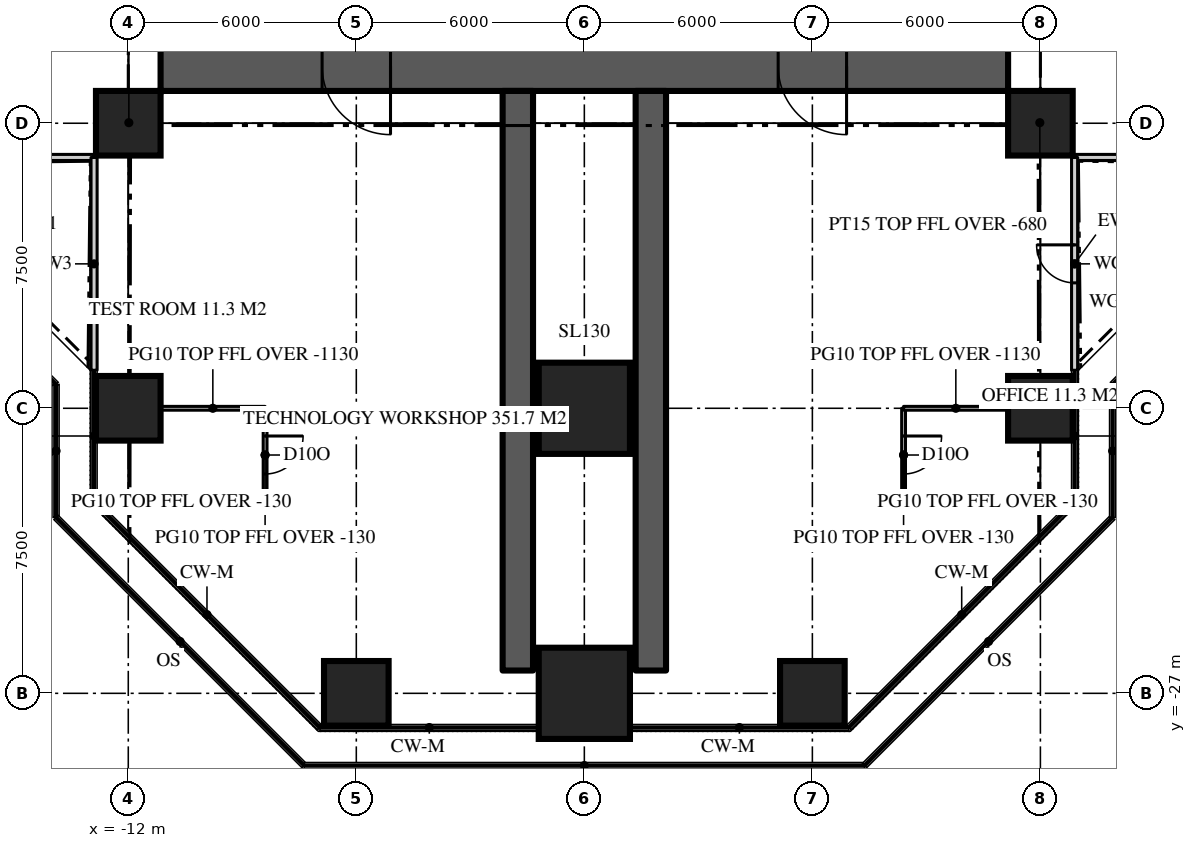
"""IFC4 building model, lengths in metres.
Left out: names, types, materials, properties, quantities, classifications, styles, units other than length and angle.
Written with IfcOpenShell. Run it as: python <this file> out.ifc"""

import sys

from ifc_helpers import new_model, si_unit, direction, frame, frame_2d, origin, origin_2d, place, context, subcontext, project, spatial, rectangle, extrude, element, fill, save


model = new_model("IFC4")
c1 = context("Model", 3, precision=1e-05, world=origin(), true_north=direction((0.0, 1.0)))
c2 = subcontext(c1, "Body", "Model", "MODEL_VIEW")
j1 = project(units=[si_unit("LENGTHUNIT", "METRE"), si_unit("PLANEANGLEUNIT", "RADIAN")], contexts=[c1])
p1 = place(None, origin())
s1 = spatial("IfcSite", under=j1, at=p1, CompositionType="ELEMENT")
p2 = place(p1, origin())
s2 = spatial("IfcBuilding", under=s1, at=p2, CompositionType="ELEMENT")
p3 = place(p2, frame((0.0, 0.0, 155.4)))
s3 = spatial("IfcBuildingStorey", under=s2, at=p3, CompositionType="ELEMENT", Elevation=155.4)
p4 = place(p3, frame((11.15, -10.5, 0.0), z_axis=(0.0, 0.0, 1.0), x_axis=(-1.0, 0.0, 0.0)))
e1 = element("IfcWall", 1, at=p4, inside=s3, PredefinedType="SHEAR", context=c2, shape_type="SweptSolid", body=[
    extrude(rectangle(XDim=22.3, YDim=1.3, at=frame_2d((11.15, 0.0))), origin(), (0.0, 0.0, 1.0), 3.9),
])
p5 = place(p4, frame((16.25, 0.0, 0.0)))
e2 = element("IfcOpeningElement", 2, at=p5, cuts=e1, PredefinedType="OPENING", context=c2, shape_type="SweptSolid", body=[
    extrude(rectangle(XDim=1.8, YDim=2.2, at=frame_2d((0.9, 1.1))), frame((0.0, 0.66, 0.0), z_axis=(0.0, -1.0, 0.0), x_axis=(1.0, 0.0, 0.0)), (0.0, 0.0, 1.0), 1.32),
])
p6 = place(p4, frame((4.25, 0.0, 0.0)))
e3 = element("IfcOpeningElement", 3, at=p6, cuts=e1, PredefinedType="OPENING", context=c2, shape_type="SweptSolid", body=[
    extrude(rectangle(XDim=1.8, YDim=2.2, at=frame_2d((0.9, 1.1))), frame((0.0, 0.66, 0.0), z_axis=(0.0, -1.0, 0.0), x_axis=(1.0, 0.0, 0.0)), (0.0, 0.0, 1.0), 1.32),
])
for number, where, z_axis, x_axis in (
    (4, (-1.75, -11.15, 0.0), (0.0, 0.0, 1.0), (0.0, -1.0, 0.0)),
    (5, (1.75, -11.15, 0.0), (0.0, 0.0, 1.0), (0.0, -1.0, 0.0)),
):
    element("IfcWall", number, at=place(p3, frame(where, z_axis=z_axis, x_axis=x_axis)), inside=s3, PredefinedType="SHEAR", context=c2, shape_type="SweptSolid", body=[
        extrude(rectangle(XDim=15.25, YDim=0.8, at=frame_2d((7.625, 0.0))), origin(), (0.0, 0.0, 1.0), 3.9),
    ])
p7 = place(p3, frame((-6.0, -27.0, 0.0), z_axis=(0.0, 0.0, 1.0), x_axis=(1.0, 0.0, 0.0)))
e6 = element("IfcColumn", 6, at=p7, inside=s3, PredefinedType="COLUMN", context=c2, shape_type="SweptSolid", body=[
    extrude(rectangle(XDim=1.7, YDim=1.7, at=origin_2d()), origin(), (0.0, 0.0, 1.0), 3.9),
])
p8 = place(p3, frame((0.0, -27.0, 0.0), z_axis=(0.0, 0.0, 1.0), x_axis=(1.0, 0.0, 0.0)))
e7 = element("IfcColumn", 7, at=p8, inside=s3, PredefinedType="COLUMN", context=c2, shape_type="SweptSolid", body=[
    extrude(rectangle(XDim=2.4, YDim=2.4, at=origin_2d()), origin(), (0.0, 0.0, 1.0), 3.9),
])
for number, where, z_axis, x_axis in (
    (8, (6.0, -27.0, 0.0), (0.0, 0.0, 1.0), (1.0, 0.0, 0.0)),
    (9, (-12.0, -19.5, 0.0), (0.0, 0.0, 1.0), (1.0, 0.0, 0.0)),
):
    element("IfcColumn", number, at=place(p3, frame(where, z_axis=z_axis, x_axis=x_axis)), inside=s3, PredefinedType="COLUMN", context=c2, shape_type="SweptSolid", body=[
        extrude(rectangle(XDim=1.7, YDim=1.7, at=origin_2d()), origin(), (0.0, 0.0, 1.0), 3.9),
    ])
p9 = place(p3, frame((0.0, -19.5, 0.0), z_axis=(0.0, 0.0, 1.0), x_axis=(1.0, 0.0, 0.0)))
e10 = element("IfcColumn", 10, at=p9, inside=s3, PredefinedType="COLUMN", context=c2, shape_type="SweptSolid", body=[
    extrude(rectangle(XDim=2.4, YDim=2.4, at=origin_2d()), origin(), (0.0, 0.0, 1.0), 3.9),
])
for number, where, z_axis, x_axis in (
    (11, (12.0, -19.5, 0.0), (0.0, 0.0, 1.0), (1.0, 0.0, 0.0)),
    (12, (-12.0, -12.0, 0.0), (0.0, 0.0, 1.0), (1.0, 0.0, 0.0)),
    (13, (12.0, -12.0, 0.0), (0.0, 0.0, 1.0), (1.0, 0.0, 0.0)),
):
    element("IfcColumn", number, at=place(p3, frame(where, z_axis=z_axis, x_axis=x_axis)), inside=s3, PredefinedType="COLUMN", context=c2, shape_type="SweptSolid", body=[
        extrude(rectangle(XDim=1.7, YDim=1.7, at=origin_2d()), origin(), (0.0, 0.0, 1.0), 3.9),
    ])
p10 = place(p3, frame((12.9, -12.9, 0.0), z_axis=(0.0, 0.0, 1.0), x_axis=(1.0, 0.0, 0.0)))
e14 = element("IfcWall", 14, at=p10, inside=s3, PredefinedType="SOLIDWALL", context=c2, shape_type="SweptSolid", body=[
    extrude(rectangle(XDim=5.6, YDim=0.16, at=frame_2d((2.8, 0.0))), origin(), (0.0, 0.0, 1.0), 3.77),
])
p11 = place(p3, frame((-18.5, -12.9, 0.0), z_axis=(0.0, 0.0, 1.0), x_axis=(1.0, 0.0, 0.0)))
e15 = element("IfcWall", 15, at=p11, inside=s3, PredefinedType="SOLIDWALL", context=c2, shape_type="SweptSolid", body=[
    extrude(rectangle(XDim=5.6, YDim=0.16, at=frame_2d((2.8, 0.0))), origin(), (0.0, 0.0, 1.0), 3.77),
])
p12 = place(p11, frame((2.3, 0.0, 0.0)))
e16 = element("IfcOpeningElement", 16, at=p12, cuts=e15, PredefinedType="OPENING", context=c2, shape_type="SweptSolid", body=[
    extrude(rectangle(XDim=1.0, YDim=2.2, at=frame_2d((0.5, 1.1))), frame((0.0, 0.09, 0.0), z_axis=(0.0, -1.0, 0.0), x_axis=(1.0, 0.0, 0.0)), (0.0, 0.0, 1.0), 0.18),
])
p13 = place(p3, frame((-12.9, -12.9, 0.0), z_axis=(0.0, 0.0, 1.0), x_axis=(0.0, -1.0, 0.0)))
e17 = element("IfcWall", 17, at=p13, inside=s3, PredefinedType="SOLIDWALL", context=c2, shape_type="SweptSolid", body=[
    extrude(rectangle(XDim=5.6, YDim=0.16, at=frame_2d((2.8, 0.0))), origin(), (0.0, 0.0, 1.0), 3.77),
])
p14 = place(p3, frame((12.9, -18.5, 0.0), z_axis=(0.0, 0.0, 1.0), x_axis=(0.0, 1.0, 0.0)))
e18 = element("IfcWall", 18, at=p14, inside=s3, PredefinedType="SOLIDWALL", context=c2, shape_type="SweptSolid", body=[
    extrude(rectangle(XDim=5.6, YDim=0.16, at=frame_2d((2.8, 0.0))), origin(), (0.0, 0.0, 1.0), 3.77),
])
p15 = place(p14, frame((2.3, 0.0, 0.0)))
e19 = element("IfcOpeningElement", 19, at=p15, cuts=e18, PredefinedType="OPENING", context=c2, shape_type="SweptSolid", body=[
    extrude(rectangle(XDim=1.0, YDim=2.2, at=frame_2d((0.5, 1.1))), frame((0.0, 0.09, 0.0), z_axis=(0.0, -1.0, 0.0), x_axis=(1.0, 0.0, 0.0)), (0.0, 0.0, 1.0), 0.18),
])
p16 = place(p3, frame((8.4, -19.5, 0.0), z_axis=(0.0, 0.0, 1.0), x_axis=(0.0, -1.0, 0.0)))
e20 = element("IfcWall", 20, at=p16, inside=s3, PredefinedType="PARTITIONING", context=c2, shape_type="SweptSolid", body=[
    extrude(rectangle(XDim=2.459, YDim=0.1, at=frame_2d((1.229, 0.0))), origin(), (0.0, 0.0, 1.0), 3.77),
])
p17 = place(p16, frame((0.729, 0.0, 0.0)))
e21 = element("IfcOpeningElement", 21, at=p17, cuts=e20, PredefinedType="OPENING", context=c2, shape_type="SweptSolid", body=[
    extrude(rectangle(XDim=1.0, YDim=2.2, at=frame_2d((0.5, 1.1))), frame((0.0, 0.06, 0.0), z_axis=(0.0, -1.0, 0.0), x_axis=(1.0, 0.0, 0.0)), (0.0, 0.0, 1.0), 0.12),
])
p18 = place(p3, frame((8.4, -19.5, 0.0), z_axis=(0.0, 0.0, 1.0), x_axis=(1.0, 0.0, 0.0)))
e22 = element("IfcWall", 22, at=p18, inside=s3, PredefinedType="PARTITIONING", context=c2, shape_type="SweptSolid", body=[
    extrude(rectangle(XDim=2.75, YDim=0.1, at=frame_2d((1.375, 0.0))), origin(), (0.0, 0.0, 1.0), 2.77),
])
p19 = place(p3, frame((8.4, -21.959, 0.0), z_axis=(0.0, 0.0, 1.0), x_axis=(1.0, 0.0, 0.0)))
e23 = element("IfcWall", 23, at=p19, inside=s3, PredefinedType="PARTITIONING", context=c2, shape_type="SweptSolid", body=[
    extrude(rectangle(XDim=4.42, YDim=0.1, at=frame_2d((2.21, 0.0))), origin(), (0.0, 0.0, 1.0), 3.77),
])
p20 = place(p3, frame((-8.4, -19.5, 0.0), z_axis=(0.0, 0.0, 1.0), x_axis=(0.0, -1.0, 0.0)))
e24 = element("IfcWall", 24, at=p20, inside=s3, PredefinedType="PARTITIONING", context=c2, shape_type="SweptSolid", body=[
    extrude(rectangle(XDim=2.459, YDim=0.1, at=frame_2d((1.229, 0.0))), origin(), (0.0, 0.0, 1.0), 3.77),
])
p21 = place(p20, frame((0.729, 0.0, 0.0)))
e25 = element("IfcOpeningElement", 25, at=p21, cuts=e24, PredefinedType="OPENING", context=c2, shape_type="SweptSolid", body=[
    extrude(rectangle(XDim=1.0, YDim=2.2, at=frame_2d((0.5, 1.1))), frame((0.0, 0.06, 0.0), z_axis=(0.0, -1.0, 0.0), x_axis=(1.0, 0.0, 0.0)), (0.0, 0.0, 1.0), 0.12),
])
p22 = place(p3, frame((-8.4, -19.5, 0.0), z_axis=(0.0, 0.0, 1.0), x_axis=(-1.0, 0.0, 0.0)))
e26 = element("IfcWall", 26, at=p22, inside=s3, PredefinedType="PARTITIONING", context=c2, shape_type="SweptSolid", body=[
    extrude(rectangle(XDim=2.75, YDim=0.1, at=frame_2d((1.375, 0.0))), origin(), (0.0, 0.0, 1.0), 2.77),
])
p23 = place(p3, frame((-8.4, -21.959, 0.0), z_axis=(0.0, 0.0, 1.0), x_axis=(-1.0, 0.0, 0.0)))
e27 = element("IfcWall", 27, at=p23, inside=s3, PredefinedType="PARTITIONING", context=c2, shape_type="SweptSolid", body=[
    extrude(rectangle(XDim=4.42, YDim=0.1, at=frame_2d((2.21, 0.0))), origin(), (0.0, 0.0, 1.0), 3.77),
])
for number, where, z_axis, x_axis in (
    (28, (-11.15, -11.15, 0.0), (0.0, 0.0, 1.0), (-0.707, -0.707, 0.0)),
    (29, (11.15, -11.15, 0.0), (0.0, 0.0, 1.0), (0.707, -0.707, 0.0)),
):
    element("IfcWall", number, at=place(p3, frame(where, z_axis=z_axis, x_axis=x_axis)), inside=s3, PredefinedType="PARTITIONING", context=c2, shape_type="SweptSolid", body=[
        extrude(rectangle(XDim=2.362, YDim=0.15, at=frame_2d((1.181, 0.0))), origin(), (0.0, 0.0, 1.0), 3.22),
    ])
p24 = place(p15, origin())
e30 = element("IfcDoor", 30, at=p24, inside=s3, OperationType="SINGLE_SWING_RIGHT", PredefinedType="DOOR", context=c2, shape_type="SweptSolid", body=[
    extrude(rectangle(XDim=1.0, YDim=2.2, at=frame_2d((0.5, 1.1))), frame((0.0, 0.025, 0.0), z_axis=(0.0, -1.0, 0.0), x_axis=(1.0, 0.0, 0.0)), (0.0, 0.0, 1.0), 0.05),
])
fill(e19, e30)
p25 = place(p5, origin())
e31 = element("IfcDoor", 31, at=p25, inside=s3, OperationType="DOUBLE_DOOR_DOUBLE_SWING", PredefinedType="DOOR", context=c2, shape_type="SweptSolid", body=[
    extrude(rectangle(XDim=1.8, YDim=2.2, at=frame_2d((0.9, 1.1))), frame((0.0, 0.025, 0.0), z_axis=(0.0, -1.0, 0.0), x_axis=(1.0, 0.0, 0.0)), (0.0, 0.0, 1.0), 0.05),
])
fill(e2, e31)
p26 = place(p6, origin())
e32 = element("IfcDoor", 32, at=p26, inside=s3, OperationType="DOUBLE_DOOR_DOUBLE_SWING", PredefinedType="DOOR", context=c2, shape_type="SweptSolid", body=[
    extrude(rectangle(XDim=1.8, YDim=2.2, at=frame_2d((0.9, 1.1))), frame((0.0, 0.025, 0.0), z_axis=(0.0, -1.0, 0.0), x_axis=(1.0, 0.0, 0.0)), (0.0, 0.0, 1.0), 0.05),
])
fill(e3, e32)
p27 = place(p17, origin())
e33 = element("IfcDoor", 33, at=p27, inside=s3, OperationType="SINGLE_SWING_LEFT", PredefinedType="DOOR", context=c2, shape_type="SweptSolid", body=[
    extrude(rectangle(XDim=1.0, YDim=2.2, at=frame_2d((0.5, 1.1))), frame((0.0, 0.025, 0.0), z_axis=(0.0, -1.0, 0.0), x_axis=(1.0, 0.0, 0.0)), (0.0, 0.0, 1.0), 0.05),
])
fill(e21, e33)
p28 = place(p21, origin())
e34 = element("IfcDoor", 34, at=p28, inside=s3, OperationType="SINGLE_SWING_LEFT", PredefinedType="DOOR", context=c2, shape_type="SweptSolid", body=[
    extrude(rectangle(XDim=1.0, YDim=2.2, at=frame_2d((0.5, 1.1))), frame((0.0, 0.025, 0.0), z_axis=(0.0, -1.0, 0.0), x_axis=(1.0, 0.0, 0.0)), (0.0, 0.0, 1.0), 0.05),
])
fill(e25, e34)
save(model, sys.argv[1])
